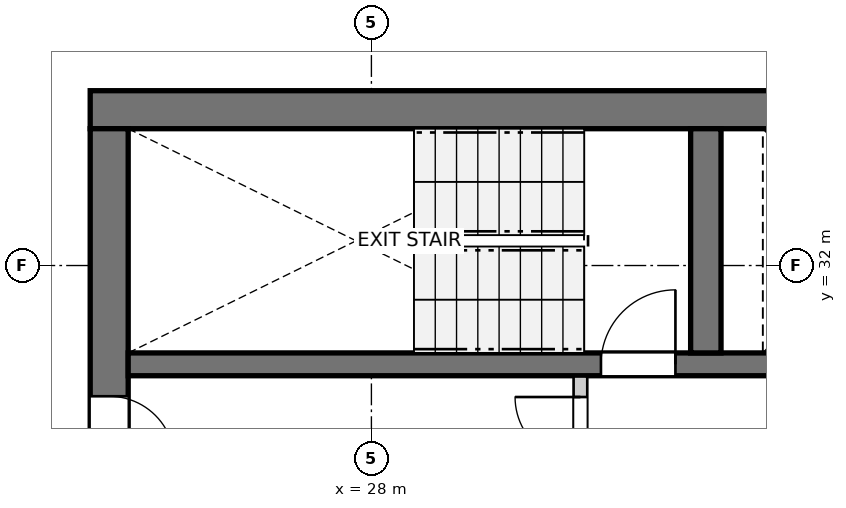
"""IFC4 building model, lengths in metres.
Left out: names, types, materials, properties, quantities, classifications, styles, units other than length and angle.
Written with IfcOpenShell. Run it as: python <this file> out.ifc"""

import sys

from ifc_helpers import new_model, si_unit, direction, frame, frame_2d, origin, place, context, subcontext, project, spatial, rectangle, extrude, source, transform, mapped, element, fill, save


model = new_model("IFC4")
c1 = context("Model", 3, precision=1e-05, world=origin(), true_north=direction((0.0, 1.0)))
c2 = subcontext(c1, "Body", "Model", "MODEL_VIEW")
j1 = project(units=[si_unit("LENGTHUNIT", "METRE"), si_unit("PLANEANGLEUNIT", "RADIAN")], contexts=[c1])
p1 = place(None, origin())
s1 = spatial("IfcSite", under=j1, at=p1, CompositionType="ELEMENT")
p2 = place(p1, origin())
s2 = spatial("IfcBuilding", under=s1, at=p2, CompositionType="ELEMENT")
p3 = place(p2, frame((0.0, 0.0, 227.6)))
s3 = spatial("IfcBuildingStorey", under=s2, at=p3, CompositionType="ELEMENT", Elevation=227.6)
p4 = place(p3, frame((36.4, 34.05, 0.0), z_axis=(0.0, 0.0, 1.0), x_axis=(-1.0, 0.0, 0.0)))
e1 = element("IfcWall", 1, at=p4, inside=s3, PredefinedType="SHEAR", context=c2, shape_type="SweptSolid", body=[
    extrude(rectangle(XDim=12.1, YDim=0.5, at=frame_2d((6.05, 0.0))), origin(), (0.0, 0.0, 1.0), 2.96),
])
p5 = place(p3, frame((24.55, 33.8, 0.0), z_axis=(0.0, 0.0, 1.0), x_axis=(0.0, -1.0, 0.0)))
e2 = element("IfcWall", 2, at=p5, inside=s3, PredefinedType="SHEAR", context=c2, shape_type="SweptSolid", body=[
    extrude(rectangle(XDim=15.6, YDim=0.5, at=frame_2d((7.8, 0.0))), origin(), (0.0, 0.0, 1.0), 2.96),
])
p6 = place(p5, frame((7.05, 0.0, 0.0)))
e3 = element("IfcOpeningElement", 3, at=p6, cuts=e2, PredefinedType="OPENING", context=c2, shape_type="SweptSolid", body=[
    extrude(rectangle(XDim=1.5, YDim=2.15, at=frame_2d((0.75, 1.075))), frame((0.0, 0.26, 0.0), z_axis=(0.0, -1.0, 0.0), x_axis=(1.0, 0.0, 0.0)), (0.0, 0.0, 1.0), 0.52),
])
p7 = place(p5, frame((3.52, 0.0, 0.0)))
e4 = element("IfcOpeningElement", 4, at=p7, cuts=e2, PredefinedType="OPENING", context=c2, shape_type="SweptSolid", body=[
    extrude(rectangle(XDim=0.86, YDim=2.05, at=frame_2d((0.43, 1.025))), frame((0.0, 0.26, 0.0), z_axis=(0.0, -1.0, 0.0), x_axis=(1.0, 0.0, 0.0)), (0.0, 0.0, 1.0), 0.52),
])
p8 = place(p5, frame((11.22, 0.0, 0.0)))
e5 = element("IfcOpeningElement", 5, at=p8, cuts=e2, PredefinedType="OPENING", context=c2, shape_type="SweptSolid", body=[
    extrude(rectangle(XDim=0.86, YDim=2.05, at=frame_2d((0.43, 1.025))), frame((0.0, 0.26, 0.0), z_axis=(0.0, -1.0, 0.0), x_axis=(1.0, 0.0, 0.0)), (0.0, 0.0, 1.0), 0.52),
])
p9 = place(p3, frame((24.8, 30.7, 0.0), z_axis=(0.0, 0.0, 1.0), x_axis=(1.0, 0.0, 0.0)))
e6 = element("IfcWall", 6, at=p9, inside=s3, PredefinedType="SHEAR", context=c2, shape_type="SweptSolid", body=[
    extrude(rectangle(XDim=11.1, YDim=0.3, at=frame_2d((5.55, 0.0))), origin(), (0.0, 0.0, 1.0), 2.96),
])
p10 = place(p9, frame((6.22, 0.0, 0.0)))
e7 = element("IfcOpeningElement", 7, at=p10, cuts=e6, PredefinedType="OPENING", context=c2, shape_type="SweptSolid", body=[
    extrude(rectangle(XDim=0.98, YDim=2.15, at=frame_2d((0.49, 1.075))), frame((0.0, 0.16, 0.0), z_axis=(0.0, -1.0, 0.0), x_axis=(1.0, 0.0, 0.0)), (0.0, 0.0, 1.0), 0.32),
])
p11 = place(p9, frame((9.15, 0.0, 0.0)))
e8 = element("IfcOpeningElement", 8, at=p11, cuts=e6, PredefinedType="OPENING", context=c2, shape_type="SweptSolid", body=[
    extrude(rectangle(XDim=1.15, YDim=2.15, at=frame_2d((0.575, 1.075))), frame((0.0, 0.16, 0.0), z_axis=(0.0, -1.0, 0.0), x_axis=(1.0, 0.0, 0.0)), (0.0, 0.0, 1.0), 0.32),
])
p12 = place(p3, frame((32.4, 30.85, 0.0), z_axis=(0.0, 0.0, 1.0), x_axis=(0.0, 1.0, 0.0)))
e9 = element("IfcWall", 9, at=p12, inside=s3, PredefinedType="SHEAR", context=c2, shape_type="SweptSolid", body=[
    extrude(rectangle(XDim=2.95, YDim=0.4, at=frame_2d((1.475, 0.0))), origin(), (0.0, 0.0, 1.0), 2.96),
])
p13 = place(p3, frame((30.75, 27.43, 0.0), z_axis=(0.0, 0.0, 1.0), x_axis=(0.0, 1.0, 0.0)))
e10 = element("IfcWall", 10, at=p13, inside=s3, PredefinedType="PARTITIONING", context=c2, shape_type="SweptSolid", body=[
    extrude(rectangle(XDim=3.11, YDim=0.18, at=frame_2d((1.555, 0.0))), origin(), (0.0, 0.0, 1.0), 2.96),
])
p14 = place(p13, frame((1.98, 0.0, 0.0)))
e11 = element("IfcOpeningElement", 11, at=p14, cuts=e10, PredefinedType="OPENING", context=c2, shape_type="SweptSolid", body=[
    extrude(rectangle(XDim=0.86, YDim=2.05, at=frame_2d((0.43, 1.025))), frame((0.0, 0.1, 0.0), z_axis=(0.0, -1.0, 0.0), x_axis=(1.0, 0.0, 0.0)), (0.0, 0.0, 1.0), 0.2),
])
m1 = source(origin(), c2, "Body", "SweptSolid", [
    extrude(rectangle(XDim=0.98, YDim=2.15, at=frame_2d((0.49, 1.075))), frame((0.0, 0.025, 0.0), z_axis=(0.0, -1.0, 0.0), x_axis=(1.0, 0.0, 0.0)), (0.0, 0.0, 1.0), 0.05),
])
p15 = place(p10, origin())
e12 = element("IfcDoor", 12, at=p15, inside=s3, OperationType="SINGLE_SWING_RIGHT", PredefinedType="DOOR", context=c2, shape_type="MappedRepresentation", body=[
    mapped(m1, transform((0.0, 0.0, 0.0), x_axis=(1.0, 0.0, 0.0), y_axis=(0.0, 1.0, 0.0), z_axis=(0.0, 0.0, 1.0), scale=1.0)),
])
fill(e7, e12)
m2 = source(origin(), c2, "Body", "SweptSolid", [
    extrude(rectangle(XDim=0.86, YDim=2.05, at=frame_2d((0.43, 1.025))), frame((0.0, 0.025, 0.0), z_axis=(0.0, -1.0, 0.0), x_axis=(1.0, 0.0, 0.0)), (0.0, 0.0, 1.0), 0.05),
])
p16 = place(p7, origin())
e13 = element("IfcDoor", 13, at=p16, inside=s3, OperationType="SINGLE_SWING_RIGHT", PredefinedType="DOOR", context=c2, shape_type="MappedRepresentation", body=[
    mapped(m2, transform((0.0, 0.0, 0.0), x_axis=(1.0, 0.0, 0.0), y_axis=(0.0, 1.0, 0.0), z_axis=(0.0, 0.0, 1.0), scale=1.0)),
])
fill(e4, e13)
p17 = place(p14, origin())
e14 = element("IfcDoor", 14, at=p17, inside=s3, OperationType="SINGLE_SWING_RIGHT", PredefinedType="DOOR", context=c2, shape_type="MappedRepresentation", body=[
    mapped(m2, transform((0.0, 0.0, 0.0), x_axis=(1.0, 0.0, 0.0), y_axis=(0.0, 1.0, 0.0), z_axis=(0.0, 0.0, 1.0), scale=1.0)),
])
fill(e11, e14)
save(model, sys.argv[1])
